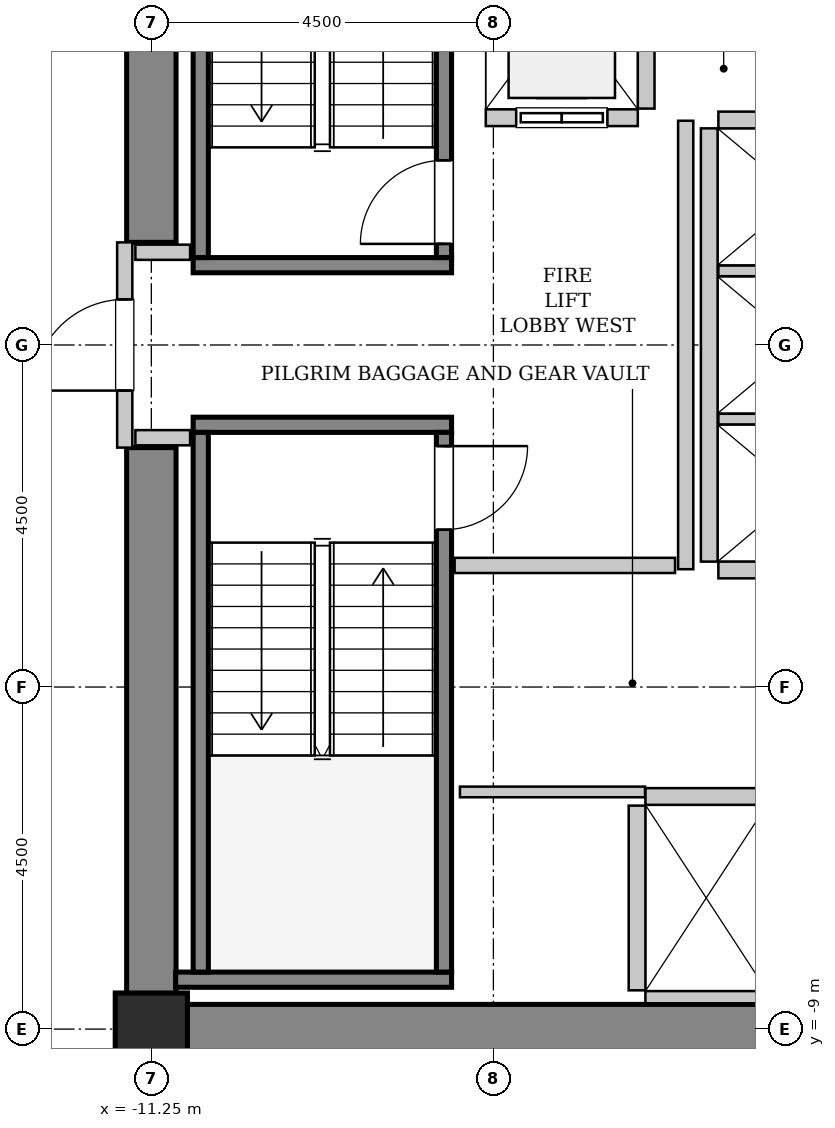
"""IFC4 building model, lengths in metres.
Left out: names, types, materials, properties, quantities, classifications, styles, units other than length and angle.
Written with IfcOpenShell. Run it as: python <this file> out.ifc"""

import sys

from ifc_helpers import new_model, si_unit, direction, frame, frame_2d, origin, origin_2d, place, context, subcontext, project, spatial, rectangle, hollow_rectangle, extrude, source, transform, mapped, element, fill, save


model = new_model("IFC4")
c1 = context("Model", 3, precision=1e-05, world=origin(), true_north=direction((0.0, 1.0)))
c2 = subcontext(c1, "Body", "Model", "MODEL_VIEW")
j1 = project(units=[si_unit("LENGTHUNIT", "METRE"), si_unit("PLANEANGLEUNIT", "RADIAN")], contexts=[c1])
p1 = place(None, origin())
s1 = spatial("IfcSite", under=j1, at=p1, CompositionType="ELEMENT")
p2 = place(p1, origin())
s2 = spatial("IfcBuilding", under=s1, at=p2, CompositionType="ELEMENT")
p3 = place(p2, frame((0.0, 0.0, 67.2)))
s3 = spatial("IfcBuildingStorey", under=s2, at=p3, CompositionType="ELEMENT", Elevation=67.2)
m1 = source(origin(), c2, "Body", "SweptSolid", [
    extrude(rectangle(XDim=10.025, YDim=0.65, at=frame_2d((5.012, 0.0))), origin(), (0.0, 0.0, 1.0), 3.8),
])
p4 = place(p3, frame((-11.575, -9.0, 0.0), z_axis=(0.0, 0.0, 1.0), x_axis=(1.0, 0.0, 0.0)))
e1 = element("IfcWall", 1, at=p4, inside=s3, PredefinedType="SHEAR", context=c2, shape_type="MappedRepresentation", body=[
    mapped(m1, transform((0.0, 0.0, 0.0), x_axis=(1.0, 0.0, 0.0), y_axis=(0.0, 1.0, 0.0), z_axis=(0.0, 0.0, 1.0), scale=1.0)),
])
m2 = source(origin(), c2, "Body", "SweptSolid", [
    extrude(rectangle(XDim=7.325, YDim=0.65, at=frame_2d((3.663, 0.0))), origin(), (0.0, 0.0, 1.0), 3.8),
])
for number, where, z_axis, x_axis in (
    (2, (-11.25, -8.675, 0.0), (0.0, 0.0, 1.0), (0.0, 1.0, 0.0)),
    (3, (-11.25, 1.35, 0.0), (0.0, 0.0, 1.0), (0.0, 1.0, 0.0)),
):
    element("IfcWall", number, at=place(p3, frame(where, z_axis=z_axis, x_axis=x_axis)), inside=s3, PredefinedType="SHEAR", context=c2, shape_type="MappedRepresentation", body=[
        mapped(m2, transform((0.0, 0.0, 0.0), x_axis=(1.0, 0.0, 0.0), y_axis=(0.0, 1.0, 0.0), z_axis=(0.0, 0.0, 1.0), scale=1.0)),
    ])
m3 = source(origin(), c2, "Body", "SweptSolid", [
    extrude(hollow_rectangle(XDim=0.95, YDim=0.95, WallThickness=0.045, InnerFilletRadius=0.045, OuterFilletRadius=0.09, at=origin_2d()), origin(), (0.0, 0.0, 1.0), 3.8),
])
p5 = place(p3, frame((-11.25, -9.0, 0.0), z_axis=(0.0, 0.0, 1.0), x_axis=(1.0, 0.0, 0.0)))
e4 = element("IfcColumn", 4, at=p5, inside=s3, PredefinedType="COLUMN", context=c2, shape_type="MappedRepresentation", body=[
    mapped(m3, transform((0.0, 0.0, 0.0), x_axis=(1.0, 0.0, 0.0), y_axis=(0.0, 1.0, 0.0), z_axis=(0.0, 0.0, 1.0), scale=1.0)),
])
m4 = source(origin(), c2, "Body", "SweptSolid", [
    extrude(rectangle(XDim=3.4, YDim=0.2, at=frame_2d((1.7, 0.0))), origin(), (0.0, 0.0, 1.0), 3.8),
])
p6 = place(p3, frame((-7.3, 1.05, 0.0), z_axis=(0.0, 0.0, 1.0), x_axis=(-1.0, 0.0, 0.0)))
e5 = element("IfcWall", 5, at=p6, inside=s3, PredefinedType="SOLIDWALL", context=c2, shape_type="MappedRepresentation", body=[
    mapped(m4, transform((0.0, 0.0, 0.0), x_axis=(1.0, 0.0, 0.0), y_axis=(0.0, 1.0, 0.0), z_axis=(0.0, 0.0, 1.0), scale=1.0)),
])
m5 = source(origin(), c2, "Body", "SweptSolid", [
    extrude(rectangle(XDim=7.1, YDim=0.2, at=frame_2d((3.55, 0.0))), origin(), (0.0, 0.0, 1.0), 3.8),
])
p7 = place(p3, frame((-7.4, 1.15, 0.0), z_axis=(0.0, 0.0, 1.0), x_axis=(0.0, 1.0, 0.0)))
e6 = element("IfcWall", 6, at=p7, inside=s3, PredefinedType="SOLIDWALL", context=c2, shape_type="MappedRepresentation", body=[
    mapped(m5, transform((0.0, 0.0, 0.0), x_axis=(1.0, 0.0, 0.0), y_axis=(0.0, 1.0, 0.0), z_axis=(0.0, 0.0, 1.0), scale=1.0)),
])
p8 = place(p7, frame((0.18, 0.0, 0.0)))
e7 = element("IfcOpeningElement", 7, at=p8, cuts=e6, PredefinedType="OPENING", context=c2, shape_type="SweptSolid", body=[
    extrude(rectangle(XDim=1.1, YDim=2.15, at=frame_2d((0.55, 1.075))), frame((0.0, 0.11, 0.0), z_axis=(0.0, -1.0, 0.0), x_axis=(1.0, 0.0, 0.0)), (0.0, 0.0, 1.0), 0.22),
])
p9 = place(p3, frame((-10.6, 1.15, 0.0), z_axis=(0.0, 0.0, 1.0), x_axis=(0.0, 1.0, 0.0)))
e8 = element("IfcWall", 8, at=p9, inside=s3, PredefinedType="SOLIDWALL", context=c2, shape_type="MappedRepresentation", body=[
    mapped(m5, transform((0.0, 0.0, 0.0), x_axis=(1.0, 0.0, 0.0), y_axis=(0.0, 1.0, 0.0), z_axis=(0.0, 0.0, 1.0), scale=1.0)),
])
p10 = place(p3, frame((-10.7, -1.05, 0.0), z_axis=(0.0, 0.0, 1.0), x_axis=(1.0, 0.0, 0.0)))
e9 = element("IfcWall", 9, at=p10, inside=s3, PredefinedType="SOLIDWALL", context=c2, shape_type="MappedRepresentation", body=[
    mapped(m4, transform((0.0, 0.0, 0.0), x_axis=(1.0, 0.0, 0.0), y_axis=(0.0, 1.0, 0.0), z_axis=(0.0, 0.0, 1.0), scale=1.0)),
])
m6 = source(origin(), c2, "Body", "SweptSolid", [
    extrude(rectangle(XDim=3.63, YDim=0.2, at=frame_2d((1.815, 0.0))), origin(), (0.0, 0.0, 1.0), 3.8),
])
p11 = place(p3, frame((-10.93, -8.35, 0.0), z_axis=(0.0, 0.0, 1.0), x_axis=(1.0, 0.0, 0.0)))
e10 = element("IfcWall", 10, at=p11, inside=s3, PredefinedType="SOLIDWALL", context=c2, shape_type="MappedRepresentation", body=[
    mapped(m6, transform((0.0, 0.0, 0.0), x_axis=(1.0, 0.0, 0.0), y_axis=(0.0, 1.0, 0.0), z_axis=(0.0, 0.0, 1.0), scale=1.0)),
])
p12 = place(p3, frame((-10.6, -1.15, 0.0), z_axis=(0.0, 0.0, 1.0), x_axis=(0.0, -1.0, 0.0)))
e11 = element("IfcWall", 11, at=p12, inside=s3, PredefinedType="SOLIDWALL", context=c2, shape_type="MappedRepresentation", body=[
    mapped(m5, transform((0.0, 0.0, 0.0), x_axis=(1.0, 0.0, 0.0), y_axis=(0.0, 1.0, 0.0), z_axis=(0.0, 0.0, 1.0), scale=1.0)),
])
p13 = place(p3, frame((-7.4, -1.15, 0.0), z_axis=(0.0, 0.0, 1.0), x_axis=(0.0, -1.0, 0.0)))
e12 = element("IfcWall", 12, at=p13, inside=s3, PredefinedType="SOLIDWALL", context=c2, shape_type="MappedRepresentation", body=[
    mapped(m5, transform((0.0, 0.0, 0.0), x_axis=(1.0, 0.0, 0.0), y_axis=(0.0, 1.0, 0.0), z_axis=(0.0, 0.0, 1.0), scale=1.0)),
])
p14 = place(p13, frame((0.18, 0.0, 0.0)))
e13 = element("IfcOpeningElement", 13, at=p14, cuts=e12, PredefinedType="OPENING", context=c2, shape_type="SweptSolid", body=[
    extrude(rectangle(XDim=1.1, YDim=2.15, at=frame_2d((0.55, 1.075))), frame((0.0, 0.11, 0.0), z_axis=(0.0, -1.0, 0.0), x_axis=(1.0, 0.0, 0.0)), (0.0, 0.0, 1.0), 0.22),
])
m7 = source(origin(), c2, "Body", "SweptSolid", [
    extrude(rectangle(XDim=2.0, YDim=0.22, at=frame_2d((1.0, 0.0))), origin(), (0.0, 0.0, 1.0), 3.535),
])
p15 = place(p3, frame((-6.85, 2.99, 0.0), z_axis=(0.0, 0.0, 1.0), x_axis=(1.0, 0.0, 0.0)))
e14 = element("IfcWall", 14, at=p15, inside=s3, PredefinedType="SOLIDWALL", context=c2, shape_type="MappedRepresentation", body=[
    mapped(m7, transform((0.0, 0.0, 0.0), x_axis=(1.0, 0.0, 0.0), y_axis=(0.0, 1.0, 0.0), z_axis=(0.0, 0.0, 1.0), scale=1.0)),
])
p16 = place(p15, frame((0.4, 0.0, 0.0)))
e15 = element("IfcOpeningElement", 15, at=p16, cuts=e14, PredefinedType="OPENING", context=c2, shape_type="SweptSolid", body=[
    extrude(rectangle(XDim=1.2, YDim=2.2, at=frame_2d((0.6, 1.1))), frame((0.0, 0.12, 0.0), z_axis=(0.0, -1.0, 0.0), x_axis=(1.0, 0.0, 0.0)), (0.0, 0.0, 1.0), 0.24),
])
m8 = source(origin(), c2, "Body", "SweptSolid", [
    extrude(rectangle(XDim=2.68, YDim=0.22, at=frame_2d((1.34, 0.0))), origin(), (0.0, 0.0, 1.0), 3.535),
])
p17 = place(p3, frame((-4.74, 3.11, 0.0), z_axis=(0.0, 0.0, 1.0), x_axis=(0.0, 1.0, 0.0)))
e16 = element("IfcWall", 16, at=p17, inside=s3, PredefinedType="SOLIDWALL", context=c2, shape_type="MappedRepresentation", body=[
    mapped(m8, transform((0.0, 0.0, 0.0), x_axis=(1.0, 0.0, 0.0), y_axis=(0.0, 1.0, 0.0), z_axis=(0.0, 0.0, 1.0), scale=1.0)),
])
m9 = source(origin(), c2, "Body", "SweptSolid", [
    extrude(rectangle(XDim=3.2, YDim=0.22, at=frame_2d((1.6, 0.0))), origin(), (0.0, 0.0, 1.0), 3.535),
])
p18 = place(p3, frame((-1.55, -5.94, 0.0), z_axis=(0.0, 0.0, 1.0), x_axis=(-1.0, 0.0, 0.0)))
e17 = element("IfcWall", 17, at=p18, inside=s3, PredefinedType="SOLIDWALL", context=c2, shape_type="MappedRepresentation", body=[
    mapped(m9, transform((0.0, 0.0, 0.0), x_axis=(1.0, 0.0, 0.0), y_axis=(0.0, 1.0, 0.0), z_axis=(0.0, 0.0, 1.0), scale=1.0)),
])
m10 = source(origin(), c2, "Body", "SweptSolid", [
    extrude(rectangle(XDim=3.2, YDim=0.16, at=frame_2d((1.6, 0.0))), origin(), (0.0, 0.0, 1.0), 2.425),
])
p19 = place(p3, frame((-4.75, -8.58, 0.0), z_axis=(0.0, 0.0, 1.0), x_axis=(1.0, 0.0, 0.0)))
e18 = element("IfcWall", 18, at=p19, inside=s3, PredefinedType="PARTITIONING", context=c2, shape_type="MappedRepresentation", body=[
    mapped(m10, transform((0.0, 0.0, 0.0), x_axis=(1.0, 0.0, 0.0), y_axis=(0.0, 1.0, 0.0), z_axis=(0.0, 0.0, 1.0), scale=1.0)),
])
m11 = source(origin(), c2, "Body", "SweptSolid", [
    extrude(rectangle(XDim=2.43, YDim=0.22, at=frame_2d((1.215, 0.0))), origin(), (0.0, 0.0, 1.0), 3.535),
])
p20 = place(p3, frame((-4.86, -6.06, 0.0), z_axis=(0.0, 0.0, 1.0), x_axis=(0.0, -1.0, 0.0)))
e19 = element("IfcWall", 19, at=p20, inside=s3, PredefinedType="SOLIDWALL", context=c2, shape_type="MappedRepresentation", body=[
    mapped(m11, transform((0.0, 0.0, 0.0), x_axis=(1.0, 0.0, 0.0), y_axis=(0.0, 1.0, 0.0), z_axis=(0.0, 0.0, 1.0), scale=1.0)),
])
m12 = source(origin(), c2, "Body", "SweptSolid", [
    extrude(rectangle(XDim=5.7, YDim=0.22, at=frame_2d((2.85, 0.0))), origin(), (0.0, 0.0, 1.0), 3.535),
])
p21 = place(p3, frame((-3.91, 2.85, 0.0), z_axis=(0.0, 0.0, 1.0), x_axis=(0.0, -1.0, 0.0)))
e20 = element("IfcWall", 20, at=p21, inside=s3, PredefinedType="SOLIDWALL", context=c2, shape_type="MappedRepresentation", body=[
    mapped(m12, transform((0.0, 0.0, 0.0), x_axis=(1.0, 0.0, 0.0), y_axis=(0.0, 1.0, 0.0), z_axis=(0.0, 0.0, 1.0), scale=1.0)),
])
m13 = source(origin(), c2, "Body", "SweptSolid", [
    extrude(rectangle(XDim=2.13, YDim=0.22, at=frame_2d((1.065, 0.0))), origin(), (0.0, 0.0, 1.0), 3.535),
])
p22 = place(p3, frame((-3.79, -2.96, 0.0), z_axis=(0.0, 0.0, 1.0), x_axis=(1.0, 0.0, 0.0)))
e21 = element("IfcWall", 21, at=p22, inside=s3, PredefinedType="SOLIDWALL", context=c2, shape_type="MappedRepresentation", body=[
    mapped(m13, transform((0.0, 0.0, 0.0), x_axis=(1.0, 0.0, 0.0), y_axis=(0.0, 1.0, 0.0), z_axis=(0.0, 0.0, 1.0), scale=1.0)),
])
m14 = source(origin(), c2, "Body", "SweptSolid", [
    extrude(rectangle(XDim=2.13, YDim=0.14, at=frame_2d((1.065, 0.0))), origin(), (0.0, 0.0, 1.0), 3.535),
])
for number, where, z_axis, x_axis in (
    (22, (-3.79, -0.975, 0.0), (0.0, 0.0, 1.0), (1.0, 0.0, 0.0)),
    (23, (-3.79, 0.975, 0.0), (0.0, 0.0, 1.0), (1.0, 0.0, 0.0)),
):
    element("IfcWall", number, at=place(p3, frame(where, z_axis=z_axis, x_axis=x_axis)), inside=s3, PredefinedType="PARTITIONING", context=c2, shape_type="MappedRepresentation", body=[
        mapped(m14, transform((0.0, 0.0, 0.0), x_axis=(1.0, 0.0, 0.0), y_axis=(0.0, 1.0, 0.0), z_axis=(0.0, 0.0, 1.0), scale=1.0)),
    ])
p23 = place(p3, frame((-1.66, 2.96, 0.0), z_axis=(0.0, 0.0, 1.0), x_axis=(-1.0, 0.0, 0.0)))
e24 = element("IfcWall", 24, at=p23, inside=s3, PredefinedType="SOLIDWALL", context=c2, shape_type="MappedRepresentation", body=[
    mapped(m13, transform((0.0, 0.0, 0.0), x_axis=(1.0, 0.0, 0.0), y_axis=(0.0, 1.0, 0.0), z_axis=(0.0, 0.0, 1.0), scale=1.0)),
])
m15 = source(origin(), c2, "Body", "SweptSolid", [
    extrude(rectangle(XDim=2.7, YDim=0.2, at=frame_2d((1.35, 0.0))), origin(), (0.0, 0.0, 1.0), 2.425),
])
p24 = place(p3, frame((-11.6, -1.35, 0.0), z_axis=(0.0, 0.0, 1.0), x_axis=(0.0, 1.0, 0.0)))
e25 = element("IfcWall", 25, at=p24, inside=s3, PredefinedType="PARTITIONING", context=c2, shape_type="MappedRepresentation", body=[
    mapped(m15, transform((0.0, 0.0, 0.0), x_axis=(1.0, 0.0, 0.0), y_axis=(0.0, 1.0, 0.0), z_axis=(0.0, 0.0, 1.0), scale=1.0)),
])
p25 = place(p24, frame((0.75, 0.0, 0.0)))
e26 = element("IfcOpeningElement", 26, at=p25, cuts=e25, PredefinedType="OPENING", context=c2, shape_type="SweptSolid", body=[
    extrude(rectangle(XDim=1.2, YDim=2.15, at=frame_2d((0.6, 1.075))), frame((0.0, 0.11, 0.0), z_axis=(0.0, -1.0, 0.0), x_axis=(1.0, 0.0, 0.0)), (0.0, 0.0, 1.0), 0.22),
])
m16 = source(origin(), c2, "Body", "SweptSolid", [
    extrude(rectangle(XDim=5.9, YDim=0.2, at=frame_2d((2.95, 0.0))), origin(), (0.0, 0.0, 1.0), 3.535),
])
p26 = place(p3, frame((-4.22, -2.95, 0.0), z_axis=(0.0, 0.0, 1.0), x_axis=(0.0, 1.0, 0.0)))
e27 = element("IfcWall", 27, at=p26, inside=s3, PredefinedType="PARTITIONING", context=c2, shape_type="MappedRepresentation", body=[
    mapped(m16, transform((0.0, 0.0, 0.0), x_axis=(1.0, 0.0, 0.0), y_axis=(0.0, 1.0, 0.0), z_axis=(0.0, 0.0, 1.0), scale=1.0)),
])
m17 = source(origin(), c2, "Body", "SweptSolid", [
    extrude(rectangle(XDim=2.9, YDim=0.2, at=frame_2d((1.45, 0.0))), origin(), (0.0, 0.0, 1.0), 3.535),
])
p27 = place(p3, frame((-7.26, -2.9, 0.0), z_axis=(0.0, 0.0, 1.0), x_axis=(1.0, 0.0, 0.0)))
e28 = element("IfcWall", 28, at=p27, inside=s3, PredefinedType="PARTITIONING", context=c2, shape_type="MappedRepresentation", body=[
    mapped(m17, transform((0.0, 0.0, 0.0), x_axis=(1.0, 0.0, 0.0), y_axis=(0.0, 1.0, 0.0), z_axis=(0.0, 0.0, 1.0), scale=1.0)),
])
m18 = source(origin(), c2, "Body", "SweptSolid", [
    extrude(rectangle(XDim=0.72, YDim=0.2, at=frame_2d((0.36, 0.0))), origin(), (0.0, 0.0, 1.0), 3.535),
])
for number, where, z_axis, x_axis in (
    (29, (-11.46, 1.22, 0.0), (0.0, 0.0, 1.0), (1.0, 0.0, 0.0)),
    (30, (-11.46, -1.22, 0.0), (0.0, 0.0, 1.0), (1.0, 0.0, 0.0)),
):
    element("IfcWall", number, at=place(p3, frame(where, z_axis=z_axis, x_axis=x_axis)), inside=s3, PredefinedType="PARTITIONING", context=c2, shape_type="MappedRepresentation", body=[
        mapped(m18, transform((0.0, 0.0, 0.0), x_axis=(1.0, 0.0, 0.0), y_axis=(0.0, 1.0, 0.0), z_axis=(0.0, 0.0, 1.0), scale=1.0)),
    ])
m19 = source(origin(), c2, "Body", "SweptSolid", [
    extrude(rectangle(XDim=2.435, YDim=0.14, at=frame_2d((1.218, 0.0))), origin(), (0.0, 0.0, 1.0), 3.535),
])
p28 = place(p3, frame((-7.19, -5.88, 0.0), z_axis=(0.0, 0.0, 1.0), x_axis=(1.0, 0.0, 0.0)))
e31 = element("IfcWall", 31, at=p28, inside=s3, PredefinedType="PARTITIONING", context=c2, shape_type="MappedRepresentation", body=[
    mapped(m19, transform((0.0, 0.0, 0.0), x_axis=(1.0, 0.0, 0.0), y_axis=(0.0, 1.0, 0.0), z_axis=(0.0, 0.0, 1.0), scale=1.0)),
])
m20 = source(origin(), c2, "Body", "SweptSolid", [
    extrude(rectangle(XDim=1.1, YDim=2.15, at=frame_2d((0.55, 1.075))), frame((0.0, 0.025, 0.0), z_axis=(0.0, -1.0, 0.0), x_axis=(1.0, 0.0, 0.0)), (0.0, 0.0, 1.0), 0.05),
])
p29 = place(p8, origin())
e32 = element("IfcDoor", 32, at=p29, inside=s3, OperationType="SINGLE_SWING_LEFT", PredefinedType="DOOR", context=c2, shape_type="MappedRepresentation", body=[
    mapped(m20, transform((0.0, 0.0, 0.0), x_axis=(1.0, 0.0, 0.0), y_axis=(0.0, 1.0, 0.0), z_axis=(0.0, 0.0, 1.0), scale=1.0)),
])
fill(e7, e32)
p30 = place(p14, origin())
e33 = element("IfcDoor", 33, at=p30, inside=s3, OperationType="SINGLE_SWING_LEFT", PredefinedType="DOOR", context=c2, shape_type="MappedRepresentation", body=[
    mapped(m20, transform((0.0, 0.0, 0.0), x_axis=(1.0, 0.0, 0.0), y_axis=(0.0, 1.0, 0.0), z_axis=(0.0, 0.0, 1.0), scale=1.0)),
])
fill(e13, e33)
m21 = source(origin(), c2, "Body", "SweptSolid", [
    extrude(rectangle(XDim=1.2, YDim=2.2, at=frame_2d((0.6, 1.1))), frame((0.0, 0.025, 0.0), z_axis=(0.0, -1.0, 0.0), x_axis=(1.0, 0.0, 0.0)), (0.0, 0.0, 1.0), 0.05),
])
p31 = place(p16, origin())
e34 = element("IfcDoor", 34, at=p31, inside=s3, OperationType="SLIDING_TO_LEFT", PredefinedType="DOOR", context=c2, shape_type="MappedRepresentation", body=[
    mapped(m21, transform((0.0, 0.0, 0.0), x_axis=(1.0, 0.0, 0.0), y_axis=(0.0, 1.0, 0.0), z_axis=(0.0, 0.0, 1.0), scale=1.0)),
])
fill(e15, e34)
m22 = source(origin(), c2, "Body", "SweptSolid", [
    extrude(rectangle(XDim=1.2, YDim=2.15, at=frame_2d((0.6, 1.075))), frame((0.0, 0.025, 0.0), z_axis=(0.0, -1.0, 0.0), x_axis=(1.0, 0.0, 0.0)), (0.0, 0.0, 1.0), 0.05),
])
p32 = place(p25, origin())
e35 = element("IfcDoor", 35, at=p32, inside=s3, OperationType="SINGLE_SWING_LEFT", PredefinedType="DOOR", context=c2, shape_type="MappedRepresentation", body=[
    mapped(m22, transform((0.0, 0.0, 0.0), x_axis=(1.0, 0.0, 0.0), y_axis=(0.0, 1.0, 0.0), z_axis=(0.0, 0.0, 1.0), scale=1.0)),
])
fill(e26, e35)
save(model, sys.argv[1])
